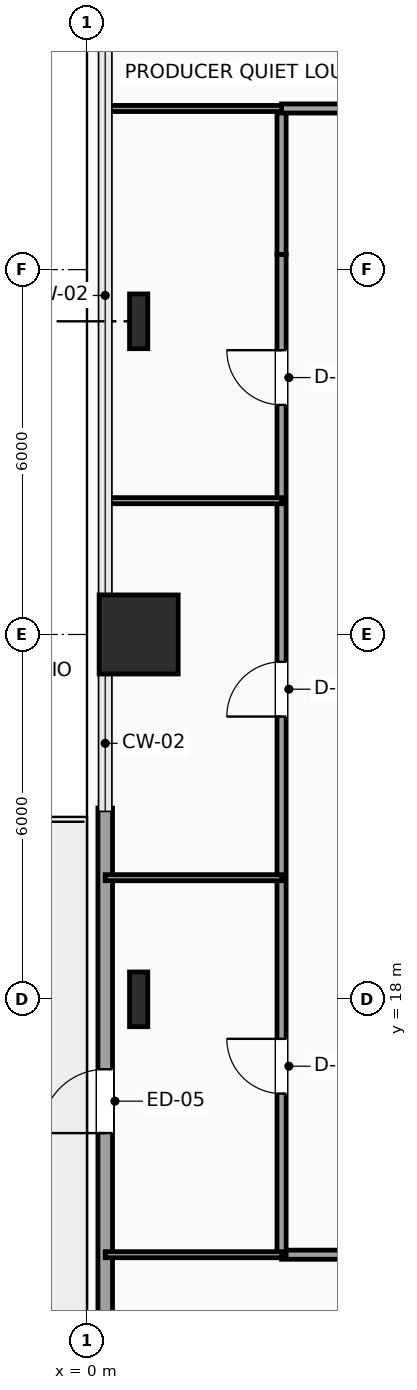
"""IFC4 building model, lengths in metres.
Left out: names, types, materials, properties, quantities, classifications, styles, units other than length and angle.
Written with IfcOpenShell. Run it as: python <this file> out.ifc"""

import sys

from ifc_helpers import new_model, si_unit, direction, frame, frame_2d, origin, origin_2d, place, context, subcontext, project, spatial, rectangle, i_section, extrude, element, fill, save


model = new_model("IFC4")
c1 = context("Model", 3, precision=1e-05, world=origin(), true_north=direction((0.0, 1.0)))
c2 = subcontext(c1, "Body", "Model", "MODEL_VIEW")
j1 = project(units=[si_unit("LENGTHUNIT", "METRE"), si_unit("PLANEANGLEUNIT", "RADIAN")], contexts=[c1])
p1 = place(None, origin())
s1 = spatial("IfcSite", under=j1, at=p1, CompositionType="ELEMENT")
p2 = place(p1, origin())
s2 = spatial("IfcBuilding", under=s1, at=p2, CompositionType="ELEMENT")
p3 = place(p2, frame((0.0, 0.0, 32.4)))
s3 = spatial("IfcBuildingStorey", under=s2, at=p3, CompositionType="ELEMENT", Elevation=32.4)
p4 = place(p3, frame((0.85, 18.0, 0.0), z_axis=(0.0, 0.0, 1.0), x_axis=(1.0, 0.0, 0.0)))
e1 = element("IfcColumn", 1, at=p4, inside=s3, PredefinedType="COLUMN", context=c2, shape_type="SweptSolid", body=[
    extrude(i_section(OverallWidth=0.3, OverallDepth=0.9, WebThickness=0.019, FlangeThickness=0.035, FilletRadius=0.03, at=origin_2d()), origin(), (0.0, 0.0, 1.0), 3.9),
])
p5 = place(p3, frame((0.85, 24.0, 0.0), z_axis=(0.0, 0.0, 1.0), x_axis=(1.0, 0.0, 0.0)))
e2 = element("IfcColumn", 2, at=p5, inside=s3, PredefinedType="COLUMN", context=c2, shape_type="SweptSolid", body=[
    extrude(rectangle(XDim=1.3, YDim=1.3, at=origin_2d()), origin(), (0.0, 0.0, 1.0), 3.9),
])
p6 = place(p3, frame((0.85, 29.15, 0.0), z_axis=(0.0, 0.0, 1.0), x_axis=(1.0, 0.0, 0.0)))
e3 = element("IfcColumn", 3, at=p6, inside=s3, PredefinedType="COLUMN", context=c2, shape_type="SweptSolid", body=[
    extrude(i_section(OverallWidth=0.3, OverallDepth=0.9, WebThickness=0.019, FlangeThickness=0.035, FilletRadius=0.03, at=origin_2d()), origin(), (0.0, 0.0, 1.0), 3.9),
])
p7 = place(p3, frame((0.3, 11.855, 0.0), z_axis=(0.0, 0.0, 1.0), x_axis=(0.0, 1.0, 0.0)))
e4 = element("IfcWall", 4, at=p7, inside=s3, PredefinedType="SOLIDWALL", context=c2, shape_type="SweptSolid", body=[
    extrude(rectangle(XDim=9.29, YDim=0.24, at=frame_2d((4.645, 0.0))), origin(), (0.0, 0.0, 1.0), 3.65),
])
p8 = place(p7, frame((3.945, 0.0, 0.0)))
e5 = element("IfcOpeningElement", 5, at=p8, cuts=e4, PredefinedType="OPENING", context=c2, shape_type="SweptSolid", body=[
    extrude(rectangle(XDim=1.05, YDim=2.2, at=frame_2d((0.525, 1.1))), frame((0.0, 0.13, 0.0), z_axis=(0.0, -1.0, 0.0), x_axis=(1.0, 0.0, 0.0)), (0.0, 0.0, 1.0), 0.26),
])
p9 = place(p3, frame((5.15, 13.8, 0.0), z_axis=(0.0, 0.0, 1.0), x_axis=(-1.0, 0.0, 0.0)))
e6 = element("IfcWall", 6, at=p9, inside=s3, PredefinedType="PARTITIONING", context=c2, shape_type="SweptSolid", body=[
    extrude(rectangle(XDim=1.95, YDim=0.15, at=frame_2d((0.975, 0.0))), origin(), (0.0, 0.0, 1.0), 3.65),
])
p10 = place(p3, frame((3.2, 13.8, 0.0), z_axis=(0.0, 0.0, 1.0), x_axis=(0.0, 1.0, 0.0)))
e7 = element("IfcWall", 7, at=p10, inside=s3, PredefinedType="PARTITIONING", context=c2, shape_type="SweptSolid", body=[
    extrude(rectangle(XDim=16.45, YDim=0.15, at=frame_2d((8.225, 0.0))), origin(), (0.0, 0.0, 1.0), 3.65),
])
p11 = place(p10, frame((2.65, 0.0, 0.0)))
e8 = element("IfcOpeningElement", 8, at=p11, cuts=e7, PredefinedType="OPENING", context=c2, shape_type="SweptSolid", body=[
    extrude(rectangle(XDim=0.9, YDim=2.1, at=frame_2d((0.45, 1.05))), frame((0.0, 0.085, 0.0), z_axis=(0.0, -1.0, 0.0), x_axis=(1.0, 0.0, 0.0)), (0.0, 0.0, 1.0), 0.17),
])
p12 = place(p10, frame((8.85, 0.0, 0.0)))
e9 = element("IfcOpeningElement", 9, at=p12, cuts=e7, PredefinedType="OPENING", context=c2, shape_type="SweptSolid", body=[
    extrude(rectangle(XDim=0.9, YDim=2.1, at=frame_2d((0.45, 1.05))), frame((0.0, 0.085, 0.0), z_axis=(0.0, -1.0, 0.0), x_axis=(1.0, 0.0, 0.0)), (0.0, 0.0, 1.0), 0.17),
])
p13 = place(p10, frame((13.975, 0.0, 0.0)))
e10 = element("IfcOpeningElement", 10, at=p13, cuts=e7, PredefinedType="OPENING", context=c2, shape_type="SweptSolid", body=[
    extrude(rectangle(XDim=0.9, YDim=2.1, at=frame_2d((0.45, 1.05))), frame((0.0, 0.085, 0.0), z_axis=(0.0, -1.0, 0.0), x_axis=(1.0, 0.0, 0.0)), (0.0, 0.0, 1.0), 0.17),
])
p14 = place(p3, frame((3.2, 30.25, 0.0), z_axis=(0.0, 0.0, 1.0), x_axis=(0.0, 1.0, 0.0)))
e11 = element("IfcWall", 11, at=p14, inside=s3, PredefinedType="PARTITIONING", context=c2, shape_type="SweptSolid", body=[
    extrude(rectangle(XDim=2.4, YDim=0.15, at=frame_2d((1.2, 0.0))), origin(), (0.0, 0.0, 1.0), 3.65),
])
p15 = place(p3, frame((3.2, 32.65, 0.0), z_axis=(0.0, 0.0, 1.0), x_axis=(1.0, 0.0, 0.0)))
e12 = element("IfcWall", 12, at=p15, inside=s3, PredefinedType="PARTITIONING", context=c2, shape_type="SweptSolid", body=[
    extrude(rectangle(XDim=2.05, YDim=0.15, at=frame_2d((1.025, 0.0))), origin(), (0.0, 0.0, 1.0), 3.65),
])
for number, where, z_axis, x_axis in (
    (13, (0.3, 13.8, 0.0), (0.0, 0.0, 1.0), (1.0, 0.0, 0.0)),
    (14, (0.3, 20.0, 0.0), (0.0, 0.0, 1.0), (1.0, 0.0, 0.0)),
    (15, (0.3, 26.2, 0.0), (0.0, 0.0, 1.0), (1.0, 0.0, 0.0)),
    (16, (0.3, 32.65, 0.0), (0.0, 0.0, 1.0), (1.0, 0.0, 0.0)),
):
    element("IfcWall", number, at=place(p3, frame(where, z_axis=z_axis, x_axis=x_axis)), inside=s3, PredefinedType="PARTITIONING", context=c2, shape_type="SweptSolid", body=[
        extrude(rectangle(XDim=2.9, YDim=0.1, at=frame_2d((1.45, 0.0))), origin(), (0.0, 0.0, 1.0), 3.65),
    ])
p16 = place(p8, origin())
e17 = element("IfcDoor", 17, at=p16, inside=s3, OperationType="SINGLE_SWING_LEFT", PredefinedType="DOOR", context=c2, shape_type="SweptSolid", body=[
    extrude(rectangle(XDim=1.05, YDim=2.2, at=frame_2d((0.525, 1.1))), frame((0.0, 0.025, 0.0), z_axis=(0.0, -1.0, 0.0), x_axis=(1.0, 0.0, 0.0)), (0.0, 0.0, 1.0), 0.05),
])
fill(e5, e17)
p17 = place(p11, origin())
e18 = element("IfcDoor", 18, at=p17, inside=s3, OperationType="SINGLE_SWING_RIGHT", PredefinedType="DOOR", context=c2, shape_type="SweptSolid", body=[
    extrude(rectangle(XDim=0.9, YDim=2.1, at=frame_2d((0.45, 1.05))), frame((0.0, 0.025, 0.0), z_axis=(0.0, -1.0, 0.0), x_axis=(1.0, 0.0, 0.0)), (0.0, 0.0, 1.0), 0.05),
])
fill(e8, e18)
p18 = place(p12, origin())
e19 = element("IfcDoor", 19, at=p18, inside=s3, OperationType="SINGLE_SWING_LEFT", PredefinedType="DOOR", context=c2, shape_type="SweptSolid", body=[
    extrude(rectangle(XDim=0.9, YDim=2.1, at=frame_2d((0.45, 1.05))), frame((0.0, 0.025, 0.0), z_axis=(0.0, -1.0, 0.0), x_axis=(1.0, 0.0, 0.0)), (0.0, 0.0, 1.0), 0.05),
])
fill(e9, e19)
p19 = place(p13, origin())
e20 = element("IfcDoor", 20, at=p19, inside=s3, OperationType="SINGLE_SWING_RIGHT", PredefinedType="DOOR", context=c2, shape_type="SweptSolid", body=[
    extrude(rectangle(XDim=0.9, YDim=2.1, at=frame_2d((0.45, 1.05))), frame((0.0, 0.025, 0.0), z_axis=(0.0, -1.0, 0.0), x_axis=(1.0, 0.0, 0.0)), (0.0, 0.0, 1.0), 0.05),
])
fill(e10, e20)
save(model, sys.argv[1])
